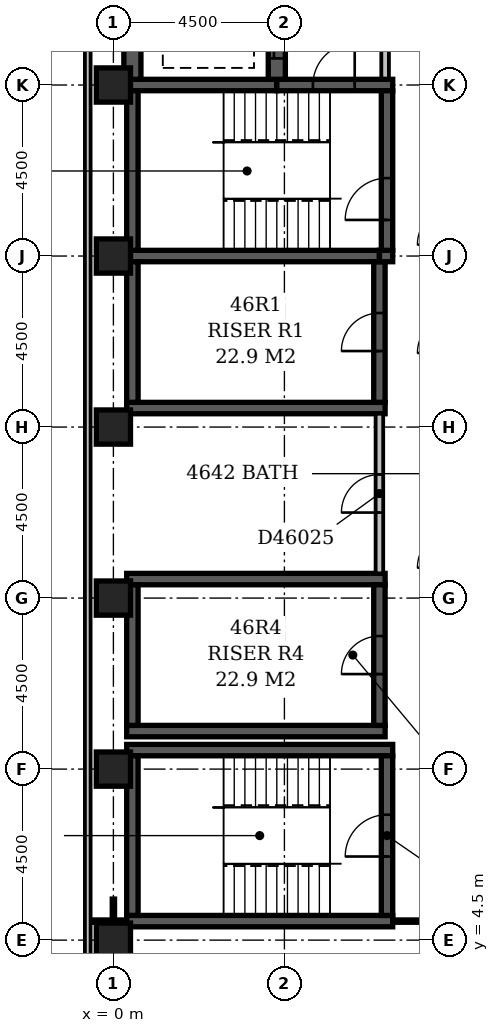
"""IFC4 building model, lengths in metres.
Left out: names, types, materials, properties, quantities, classifications, styles, units other than length and angle.
Written with IfcOpenShell. Run it as: python <this file> out.ifc"""

import sys

from ifc_helpers import new_model, si_unit, direction, frame, frame_2d, origin, origin_2d, place, context, subcontext, project, spatial, rectangle, extrude, element, fill, save


model = new_model("IFC4")
c1 = context("Model", 3, precision=1e-05, world=origin(), true_north=direction((0.0, 1.0)))
c2 = subcontext(c1, "Body", "Model", "MODEL_VIEW")
j1 = project(units=[si_unit("LENGTHUNIT", "METRE"), si_unit("PLANEANGLEUNIT", "RADIAN")], contexts=[c1])
p1 = place(None, origin())
s1 = spatial("IfcSite", under=j1, at=p1, CompositionType="ELEMENT")
p2 = place(p1, origin())
s2 = spatial("IfcBuilding", under=s1, at=p2, CompositionType="ELEMENT")
p3 = place(p2, frame((0.0, 0.0, 182.6)))
s3 = spatial("IfcBuildingStorey", under=s2, at=p3, CompositionType="ELEMENT", Elevation=182.6)
for number, where, z_axis, x_axis in (
    (1, (0.35, 5.0, -0.3), (0.0, 0.0, 1.0), (1.0, 0.0, 0.0)),
    (2, (0.35, 9.5, -0.3), (0.0, 0.0, 1.0), (1.0, 0.0, 0.0)),
):
    element("IfcWall", number, at=place(p3, frame(where, z_axis=z_axis, x_axis=x_axis)), inside=s3, PredefinedType="SHEAR", context=c2, shape_type="SweptSolid", body=[
        extrude(rectangle(XDim=7.0, YDim=0.3, at=frame_2d((3.5, 0.0))), origin(), (0.0, 0.0, 1.0), 3.55),
    ])
for number, where, z_axis, x_axis in (
    (3, (0.35, 10.0, -0.3), (0.0, 0.0, 1.0), (1.0, 0.0, 0.0)),
    (4, (0.35, 14.0, -0.3), (0.0, 0.0, 1.0), (1.0, 0.0, 0.0)),
    (5, (0.35, 18.5, -0.3), (0.0, 0.0, 1.0), (1.0, 0.0, 0.0)),
):
    element("IfcWall", number, at=place(p3, frame(where, z_axis=z_axis, x_axis=x_axis)), inside=s3, PredefinedType="SHEAR", context=c2, shape_type="SweptSolid", body=[
        extrude(rectangle(XDim=6.8, YDim=0.3, at=frame_2d((3.4, 0.0))), origin(), (0.0, 0.0, 1.0), 3.55),
    ])
p4 = place(p3, frame((0.35, 22.5, -0.3), z_axis=(0.0, 0.0, 1.0), x_axis=(1.0, 0.0, 0.0)))
e6 = element("IfcWall", 6, at=p4, inside=s3, PredefinedType="SHEAR", context=c2, shape_type="SweptSolid", body=[
    extrude(rectangle(XDim=6.65, YDim=0.3, at=frame_2d((3.325, 0.0))), origin(), (0.0, 0.0, 1.0), 3.55),
])
p5 = place(p3, frame((0.35, 27.0, -0.3), z_axis=(0.0, 0.0, 1.0), x_axis=(1.0, 0.0, 0.0)))
e7 = element("IfcWall", 7, at=p5, inside=s3, PredefinedType="SHEAR", context=c2, shape_type="SweptSolid", body=[
    extrude(rectangle(XDim=3.95, YDim=0.3, at=frame_2d((1.975, 0.0))), origin(), (0.0, 0.0, 1.0), 3.55),
])
p6 = place(p3, frame((0.5, 5.15, -0.3), z_axis=(0.0, 0.0, 1.0), x_axis=(0.0, 1.0, 0.0)))
e8 = element("IfcWall", 8, at=p6, inside=s3, PredefinedType="SHEAR", context=c2, shape_type="SweptSolid", body=[
    extrude(rectangle(XDim=4.2, YDim=0.3, at=frame_2d((2.1, 0.0))), origin(), (0.0, 0.0, 1.0), 3.55),
])
for number, where, z_axis, x_axis in (
    (9, (0.5, 10.15, -0.3), (0.0, 0.0, 1.0), (0.0, 1.0, 0.0)),
    (10, (0.5, 18.65, -0.3), (0.0, 0.0, 1.0), (0.0, 1.0, 0.0)),
):
    element("IfcWall", number, at=place(p3, frame(where, z_axis=z_axis, x_axis=x_axis)), inside=s3, PredefinedType="SHEAR", context=c2, shape_type="SweptSolid", body=[
        extrude(rectangle(XDim=3.7, YDim=0.3, at=frame_2d((1.85, 0.0))), origin(), (0.0, 0.0, 1.0), 3.55),
    ])
p7 = place(p3, frame((0.5, 22.65, -0.3), z_axis=(0.0, 0.0, 1.0), x_axis=(0.0, 1.0, 0.0)))
e11 = element("IfcWall", 11, at=p7, inside=s3, PredefinedType="SHEAR", context=c2, shape_type="SweptSolid", body=[
    extrude(rectangle(XDim=4.2, YDim=0.3, at=frame_2d((2.1, 0.0))), origin(), (0.0, 0.0, 1.0), 3.55),
])
p8 = place(p3, frame((0.5, 27.15, -0.3), z_axis=(0.0, 0.0, 1.0), x_axis=(0.0, 1.0, 0.0)))
e12 = element("IfcWall", 12, at=p8, inside=s3, PredefinedType="SHEAR", context=c2, shape_type="SweptSolid", body=[
    extrude(rectangle(XDim=22.125, YDim=0.45, at=frame_2d((11.062, 0.0))), origin(), (0.0, 0.0, 1.0), 3.55),
])
p9 = place(p3, frame((4.3, 27.0, -0.3), z_axis=(0.0, 0.0, 1.0), x_axis=(1.0, 0.0, 0.0)))
e13 = element("IfcWall", 13, at=p9, inside=s3, PredefinedType="SHEAR", context=c2, shape_type="SweptSolid", body=[
    extrude(rectangle(XDim=3.05, YDim=0.3, at=frame_2d((1.525, 0.0))), origin(), (0.0, 0.0, 1.0), 3.55),
])
p10 = place(p9, frame((0.95, 0.0, 0.3)))
e14 = element("IfcOpeningElement", 14, at=p10, cuts=e13, PredefinedType="OPENING", context=c2, shape_type="SweptSolid", body=[
    extrude(rectangle(XDim=1.1, YDim=2.1, at=frame_2d((0.55, 1.05))), frame((0.0, 0.162, 0.0), z_axis=(0.0, -1.0, 0.0), x_axis=(1.0, 0.0, 0.0)), (0.0, 0.0, 1.0), 0.324),
])
p11 = place(p3, frame((4.3, 27.15, -0.3), z_axis=(0.0, 0.0, 1.0), x_axis=(0.0, 1.0, 0.0)))
e15 = element("IfcWall", 15, at=p11, inside=s3, PredefinedType="SHEAR", context=c2, shape_type="SweptSolid", body=[
    extrude(rectangle(XDim=22.125, YDim=0.45, at=frame_2d((11.062, 0.0))), origin(), (0.0, 0.0, 1.0), 3.55),
])
p12 = place(p11, frame((3.05, 0.0, 0.3)))
e16 = element("IfcOpeningElement", 16, at=p12, cuts=e15, PredefinedType="OPENING", context=c2, shape_type="SweptSolid", body=[
    extrude(rectangle(XDim=1.1, YDim=2.1, at=frame_2d((0.55, 1.05))), frame((0.0, 0.237, 0.0), z_axis=(0.0, -1.0, 0.0), x_axis=(1.0, 0.0, 0.0)), (0.0, 0.0, 1.0), 0.474),
])
p13 = place(p11, frame((0.55, 0.0, 0.3)))
e17 = element("IfcOpeningElement", 17, at=p13, cuts=e15, PredefinedType="OPENING", context=c2, shape_type="SweptSolid", body=[
    extrude(rectangle(XDim=1.1, YDim=2.1, at=frame_2d((0.55, 1.05))), frame((0.0, 0.237, 0.0), z_axis=(0.0, -1.0, 0.0), x_axis=(1.0, 0.0, 0.0)), (0.0, 0.0, 1.0), 0.474),
])
p14 = place(p11, frame((20.55, 0.0, 0.3)))
e18 = element("IfcOpeningElement", 18, at=p14, cuts=e15, PredefinedType="OPENING", context=c2, shape_type="SweptSolid", body=[
    extrude(rectangle(XDim=1.1, YDim=2.1, at=frame_2d((0.55, 1.05))), frame((0.0, 0.237, 0.0), z_axis=(0.0, -1.0, 0.0), x_axis=(1.0, 0.0, 0.0)), (0.0, 0.0, 1.0), 0.474),
])
p15 = place(p11, frame((18.05, 0.0, 0.3)))
e19 = element("IfcOpeningElement", 19, at=p15, cuts=e15, PredefinedType="OPENING", context=c2, shape_type="SweptSolid", body=[
    extrude(rectangle(XDim=1.1, YDim=2.1, at=frame_2d((0.55, 1.05))), frame((0.0, 0.237, 0.0), z_axis=(0.0, -1.0, 0.0), x_axis=(1.0, 0.0, 0.0)), (0.0, 0.0, 1.0), 0.474),
])
p16 = place(p11, frame((15.55, 0.0, 0.3)))
e20 = element("IfcOpeningElement", 20, at=p16, cuts=e15, PredefinedType="OPENING", context=c2, shape_type="SweptSolid", body=[
    extrude(rectangle(XDim=1.1, YDim=2.1, at=frame_2d((0.55, 1.05))), frame((0.0, 0.237, 0.0), z_axis=(0.0, -1.0, 0.0), x_axis=(1.0, 0.0, 0.0)), (0.0, 0.0, 1.0), 0.474),
])
p17 = place(p11, frame((13.05, 0.0, 0.3)))
e21 = element("IfcOpeningElement", 21, at=p17, cuts=e15, PredefinedType="OPENING", context=c2, shape_type="SweptSolid", body=[
    extrude(rectangle(XDim=1.1, YDim=2.1, at=frame_2d((0.55, 1.05))), frame((0.0, 0.237, 0.0), z_axis=(0.0, -1.0, 0.0), x_axis=(1.0, 0.0, 0.0)), (0.0, 0.0, 1.0), 0.474),
])
p18 = place(p11, frame((10.55, 0.0, 0.3)))
e22 = element("IfcOpeningElement", 22, at=p18, cuts=e15, PredefinedType="OPENING", context=c2, shape_type="SweptSolid", body=[
    extrude(rectangle(XDim=1.1, YDim=2.1, at=frame_2d((0.55, 1.05))), frame((0.0, 0.237, 0.0), z_axis=(0.0, -1.0, 0.0), x_axis=(1.0, 0.0, 0.0)), (0.0, 0.0, 1.0), 0.474),
])
p19 = place(p11, frame((8.05, 0.0, 0.3)))
e23 = element("IfcOpeningElement", 23, at=p19, cuts=e15, PredefinedType="OPENING", context=c2, shape_type="SweptSolid", body=[
    extrude(rectangle(XDim=1.1, YDim=2.1, at=frame_2d((0.55, 1.05))), frame((0.0, 0.237, 0.0), z_axis=(0.0, -1.0, 0.0), x_axis=(1.0, 0.0, 0.0)), (0.0, 0.0, 1.0), 0.474),
])
p20 = place(p11, frame((5.55, 0.0, 0.3)))
e24 = element("IfcOpeningElement", 24, at=p20, cuts=e15, PredefinedType="OPENING", context=c2, shape_type="SweptSolid", body=[
    extrude(rectangle(XDim=1.1, YDim=2.1, at=frame_2d((0.55, 1.05))), frame((0.0, 0.237, 0.0), z_axis=(0.0, -1.0, 0.0), x_axis=(1.0, 0.0, 0.0)), (0.0, 0.0, 1.0), 0.474),
])
p21 = place(p3, frame((7.0, 10.15, -0.3), z_axis=(0.0, 0.0, 1.0), x_axis=(0.0, 1.0, 0.0)))
e25 = element("IfcWall", 25, at=p21, inside=s3, PredefinedType="SHEAR", context=c2, shape_type="SweptSolid", body=[
    extrude(rectangle(XDim=3.7, YDim=0.3, at=frame_2d((1.85, 0.0))), origin(), (0.0, 0.0, 1.0), 3.55),
])
p22 = place(p21, frame((1.35, 0.0, 0.3)))
e26 = element("IfcOpeningElement", 26, at=p22, cuts=e25, PredefinedType="OPENING", context=c2, shape_type="SweptSolid", body=[
    extrude(rectangle(XDim=1.0, YDim=2.1, at=frame_2d((0.5, 1.05))), frame((0.0, 0.162, 0.0), z_axis=(0.0, -1.0, 0.0), x_axis=(1.0, 0.0, 0.0)), (0.0, 0.0, 1.0), 0.324),
])
p23 = place(p3, frame((7.0, 18.65, -0.3), z_axis=(0.0, 0.0, 1.0), x_axis=(0.0, 1.0, 0.0)))
e27 = element("IfcWall", 27, at=p23, inside=s3, PredefinedType="SHEAR", context=c2, shape_type="SweptSolid", body=[
    extrude(rectangle(XDim=3.7, YDim=0.3, at=frame_2d((1.85, 0.0))), origin(), (0.0, 0.0, 1.0), 3.55),
])
p24 = place(p23, frame((1.35, 0.0, 0.3)))
e28 = element("IfcOpeningElement", 28, at=p24, cuts=e27, PredefinedType="OPENING", context=c2, shape_type="SweptSolid", body=[
    extrude(rectangle(XDim=1.0, YDim=2.1, at=frame_2d((0.5, 1.05))), frame((0.0, 0.162, 0.0), z_axis=(0.0, -1.0, 0.0), x_axis=(1.0, 0.0, 0.0)), (0.0, 0.0, 1.0), 0.324),
])
p25 = place(p3, frame((7.0, 22.5, -0.3), z_axis=(0.0, 0.0, 1.0), x_axis=(1.0, 0.0, 0.0)))
e29 = element("IfcWall", 29, at=p25, inside=s3, PredefinedType="SHEAR", context=c2, shape_type="SweptSolid", body=[
    extrude(rectangle(XDim=0.35, YDim=0.3, at=frame_2d((0.175, 0.0))), origin(), (0.0, 0.0, 1.0), 3.55),
])
p26 = place(p3, frame((7.2, 5.15, -0.3), z_axis=(0.0, 0.0, 1.0), x_axis=(0.0, 1.0, 0.0)))
e30 = element("IfcWall", 30, at=p26, inside=s3, PredefinedType="SHEAR", context=c2, shape_type="SweptSolid", body=[
    extrude(rectangle(XDim=4.2, YDim=0.3, at=frame_2d((2.1, 0.0))), origin(), (0.0, 0.0, 1.0), 3.55),
])
p27 = place(p26, frame((1.55, 0.0, 0.3)))
e31 = element("IfcOpeningElement", 31, at=p27, cuts=e30, PredefinedType="OPENING", context=c2, shape_type="SweptSolid", body=[
    extrude(rectangle(XDim=1.1, YDim=2.1, at=frame_2d((0.55, 1.05))), frame((0.0, 0.162, 0.0), z_axis=(0.0, -1.0, 0.0), x_axis=(1.0, 0.0, 0.0)), (0.0, 0.0, 1.0), 0.324),
])
p28 = place(p3, frame((7.2, 22.65, -0.3), z_axis=(0.0, 0.0, 1.0), x_axis=(0.0, 1.0, 0.0)))
e32 = element("IfcWall", 32, at=p28, inside=s3, PredefinedType="SHEAR", context=c2, shape_type="SweptSolid", body=[
    extrude(rectangle(XDim=4.2, YDim=0.3, at=frame_2d((2.1, 0.0))), origin(), (0.0, 0.0, 1.0), 3.55),
])
p29 = place(p28, frame((0.8, 0.0, 0.3)))
e33 = element("IfcOpeningElement", 33, at=p29, cuts=e32, PredefinedType="OPENING", context=c2, shape_type="SweptSolid", body=[
    extrude(rectangle(XDim=1.1, YDim=2.1, at=frame_2d((0.55, 1.05))), frame((0.0, 0.162, 0.0), z_axis=(0.0, -1.0, 0.0), x_axis=(1.0, 0.0, 0.0)), (0.0, 0.0, 1.0), 0.324),
])
for number, where, z_axis, x_axis in (
    (34, (0.0, 4.5, -0.3), (0.0, 0.0, 1.0), (1.0, 0.0, 0.0)),
    (35, (0.0, 9.0, -0.3), (0.0, 0.0, 1.0), (1.0, 0.0, 0.0)),
    (36, (0.0, 13.5, -0.3), (0.0, 0.0, 1.0), (1.0, 0.0, 0.0)),
    (37, (0.0, 18.0, -0.3), (0.0, 0.0, 1.0), (1.0, 0.0, 0.0)),
    (38, (0.0, 22.5, -0.3), (0.0, 0.0, 1.0), (1.0, 0.0, 0.0)),
    (39, (0.0, 27.0, -0.3), (0.0, 0.0, 1.0), (1.0, 0.0, 0.0)),
):
    element("IfcColumn", number, at=place(p3, frame(where, z_axis=z_axis, x_axis=x_axis)), inside=s3, PredefinedType="COLUMN", context=c2, shape_type="SweptSolid", body=[
        extrude(rectangle(XDim=0.9, YDim=0.9, at=origin_2d()), origin(), (0.0, 0.0, 1.0), 3.55),
    ])
p30 = place(p3, frame((-0.675, 59.1, 0.0), z_axis=(0.0, 0.0, 1.0), x_axis=(0.0, -1.0, 0.0)))
e40 = element("IfcWall", 40, at=p30, inside=s3, PredefinedType="STANDARD", context=c2, shape_type="SweptSolid", body=[
    extrude(rectangle(XDim=55.35, YDim=0.15, at=frame_2d((27.675, 0.0))), origin(), (0.0, 0.0, 1.0), 2.7),
])
p31 = place(p3, frame((7.15, 27.17, 0.0), z_axis=(0.0, 0.0, 1.0), x_axis=(0.0, 1.0, 0.0)))
e41 = element("IfcWall", 41, at=p31, inside=s3, PredefinedType="PARTITIONING", context=c2, shape_type="SweptSolid", body=[
    extrude(rectangle(XDim=4.83, YDim=0.2, at=frame_2d((2.415, 0.0))), origin(), (0.0, 0.0, 1.0), 3.25),
])
p32 = place(p31, frame((1.73, 0.0, 0.0)))
e42 = element("IfcOpeningElement", 42, at=p32, cuts=e41, PredefinedType="OPENING", context=c2, shape_type="SweptSolid", body=[
    extrude(rectangle(XDim=1.2, YDim=2.1, at=frame_2d((0.6, 1.05))), frame((0.0, 0.112, 0.0), z_axis=(0.0, -1.0, 0.0), x_axis=(1.0, 0.0, 0.0)), (0.0, 0.0, 1.0), 0.224),
])
p33 = place(p3, frame((0.0, 4.95, 0.0), z_axis=(0.0, 0.0, 1.0), x_axis=(0.0, 1.0, 0.0)))
e43 = element("IfcWall", 43, at=p33, inside=s3, PredefinedType="PARTITIONING", context=c2, shape_type="SweptSolid", body=[
    extrude(rectangle(XDim=0.65, YDim=0.1, at=frame_2d((0.325, 0.0))), origin(), (0.0, 0.0, 1.0), 2.7),
])
p34 = place(p3, frame((-0.6, 5.0, 0.0), z_axis=(0.0, 0.0, 1.0), x_axis=(1.0, 0.0, 0.0)))
e44 = element("IfcWall", 44, at=p34, inside=s3, PredefinedType="PARTITIONING", context=c2, shape_type="SweptSolid", body=[
    extrude(rectangle(XDim=0.951, YDim=0.1, at=frame_2d((0.476, 0.0))), origin(), (0.0, 0.0, 1.0), 3.25),
])
p35 = place(p3, frame((7.349, 5.0, 0.0), z_axis=(0.0, 0.0, 1.0), x_axis=(1.0, 0.0, 0.0)))
e45 = element("IfcWall", 45, at=p35, inside=s3, PredefinedType="PARTITIONING", context=c2, shape_type="SweptSolid", body=[
    extrude(rectangle(XDim=1.551, YDim=0.1, at=frame_2d((0.775, 0.0))), origin(), (0.0, 0.0, 1.0), 3.25),
])
p36 = place(p3, frame((7.0, 14.15, 0.0), z_axis=(0.0, 0.0, 1.0), x_axis=(0.0, 1.0, 0.0)))
e46 = element("IfcWall", 46, at=p36, inside=s3, PredefinedType="PARTITIONING", context=c2, shape_type="SweptSolid", body=[
    extrude(rectangle(XDim=4.2, YDim=0.2, at=frame_2d((2.1, 0.0))), origin(), (0.0, 0.0, 1.0), 3.25),
])
p37 = place(p36, frame((1.6, 0.0, 0.0)))
e47 = element("IfcOpeningElement", 47, at=p37, cuts=e46, PredefinedType="OPENING", context=c2, shape_type="SweptSolid", body=[
    extrude(rectangle(XDim=1.0, YDim=2.1, at=frame_2d((0.5, 1.05))), frame((0.0, 0.112, 0.0), z_axis=(0.0, -1.0, 0.0), x_axis=(1.0, 0.0, 0.0)), (0.0, 0.0, 1.0), 0.224),
])
p38 = place(p13, origin())
e48 = element("IfcDoor", 48, at=p38, inside=s3, OperationType="SLIDING_TO_LEFT", PredefinedType="DOOR", context=c2, shape_type="SweptSolid", body=[
    extrude(rectangle(XDim=1.1, YDim=2.1, at=frame_2d((0.55, 1.05))), frame((0.0, 0.025, 0.0), z_axis=(0.0, -1.0, 0.0), x_axis=(1.0, 0.0, 0.0)), (0.0, 0.0, 1.0), 0.05),
])
fill(e17, e48)
p39 = place(p24, origin())
e49 = element("IfcDoor", 49, at=p39, inside=s3, OperationType="SINGLE_SWING_LEFT", PredefinedType="DOOR", context=c2, shape_type="SweptSolid", body=[
    extrude(rectangle(XDim=1.0, YDim=2.1, at=frame_2d((0.5, 1.05))), frame((0.0, 0.025, 0.0), z_axis=(0.0, -1.0, 0.0), x_axis=(1.0, 0.0, 0.0)), (0.0, 0.0, 1.0), 0.05),
])
fill(e28, e49)
p40 = place(p22, origin())
e50 = element("IfcDoor", 50, at=p40, inside=s3, OperationType="SINGLE_SWING_LEFT", PredefinedType="DOOR", context=c2, shape_type="SweptSolid", body=[
    extrude(rectangle(XDim=1.0, YDim=2.1, at=frame_2d((0.5, 1.05))), frame((0.0, 0.025, 0.0), z_axis=(0.0, -1.0, 0.0), x_axis=(1.0, 0.0, 0.0)), (0.0, 0.0, 1.0), 0.05),
])
fill(e26, e50)
p41 = place(p10, frame((1.1, 0.0, 0.0), z_axis=(0.0, 0.0, 1.0), x_axis=(-1.0, 0.0, 0.0)))
e51 = element("IfcDoor", 51, at=p41, inside=s3, OperationType="SINGLE_SWING_LEFT", PredefinedType="DOOR", context=c2, shape_type="SweptSolid", body=[
    extrude(rectangle(XDim=1.1, YDim=2.1, at=frame_2d((0.55, 1.05))), frame((0.0, 0.025, 0.0), z_axis=(0.0, -1.0, 0.0), x_axis=(1.0, 0.0, 0.0)), (0.0, 0.0, 1.0), 0.05),
])
fill(e14, e51)
p42 = place(p29, origin())
e52 = element("IfcDoor", 52, at=p42, inside=s3, OperationType="SINGLE_SWING_LEFT", PredefinedType="DOOR", context=c2, shape_type="SweptSolid", body=[
    extrude(rectangle(XDim=1.1, YDim=2.1, at=frame_2d((0.55, 1.05))), frame((0.0, 0.025, 0.0), z_axis=(0.0, -1.0, 0.0), x_axis=(1.0, 0.0, 0.0)), (0.0, 0.0, 1.0), 0.05),
])
fill(e33, e52)
p43 = place(p27, origin())
e53 = element("IfcDoor", 53, at=p43, inside=s3, OperationType="SINGLE_SWING_LEFT", PredefinedType="DOOR", context=c2, shape_type="SweptSolid", body=[
    extrude(rectangle(XDim=1.1, YDim=2.1, at=frame_2d((0.55, 1.05))), frame((0.0, 0.025, 0.0), z_axis=(0.0, -1.0, 0.0), x_axis=(1.0, 0.0, 0.0)), (0.0, 0.0, 1.0), 0.05),
])
fill(e31, e53)
p44 = place(p37, origin())
e54 = element("IfcDoor", 54, at=p44, inside=s3, OperationType="SINGLE_SWING_LEFT", PredefinedType="DOOR", context=c2, shape_type="SweptSolid", body=[
    extrude(rectangle(XDim=1.0, YDim=2.1, at=frame_2d((0.5, 1.05))), frame((0.0, 0.025, 0.0), z_axis=(0.0, -1.0, 0.0), x_axis=(1.0, 0.0, 0.0)), (0.0, 0.0, 1.0), 0.05),
])
fill(e47, e54)
save(model, sys.argv[1])
